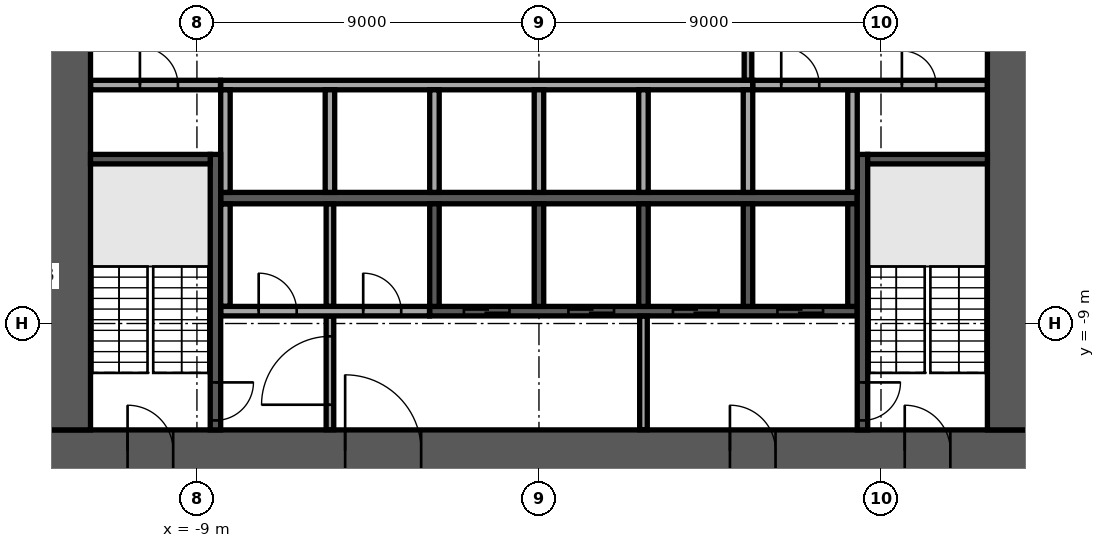
"""IFC4 building model, lengths in metres.
Left out: names, types, materials, properties, quantities, classifications, styles, units other than length and angle.
Written with IfcOpenShell. Run it as: python <this file> out.ifc"""

import sys

from ifc_helpers import new_model, si_unit, direction, frame, frame_2d, origin, place, context, subcontext, project, spatial, rectangle, extrude, element, fill, save


model = new_model("IFC4")
c1 = context("Model", 3, precision=1e-05, world=origin(), true_north=direction((0.0, 1.0)))
c2 = subcontext(c1, "Body", "Model", "MODEL_VIEW")
j1 = project(units=[si_unit("LENGTHUNIT", "METRE"), si_unit("PLANEANGLEUNIT", "RADIAN")], contexts=[c1])
p1 = place(None, origin())
s1 = spatial("IfcSite", under=j1, at=p1, CompositionType="ELEMENT")
p2 = place(p1, origin())
s2 = spatial("IfcBuilding", under=s1, at=p2, CompositionType="ELEMENT")
p3 = place(p2, frame((0.0, 0.0, 90.1)))
s3 = spatial("IfcBuildingStorey", under=s2, at=p3, CompositionType="ELEMENT", Elevation=90.1)
p4 = place(p3, frame((-12.9, -12.35, 0.0), z_axis=(0.0, 0.0, 1.0), x_axis=(1.0, 0.0, 0.0)))
e1 = element("IfcWall", 1, at=p4, inside=s3, PredefinedType="SHEAR", context=c2, shape_type="SweptSolid", body=[
    extrude(rectangle(XDim=25.8, YDim=1.1, at=frame_2d((12.9, 0.0))), origin(), (0.0, 0.0, 1.0), 3.58),
])
p5 = place(p4, frame((7.8, 0.0, 0.0)))
e2 = element("IfcOpeningElement", 2, at=p5, cuts=e1, PredefinedType="OPENING", context=c2, shape_type="SweptSolid", body=[
    extrude(rectangle(XDim=2.0, YDim=2.1, at=frame_2d((1.0, 1.05))), frame((0.0, 0.56, 0.0), z_axis=(0.0, -1.0, 0.0), x_axis=(1.0, 0.0, 0.0)), (0.0, 0.0, 1.0), 1.12),
])
p6 = place(p4, frame((17.925, 0.0, 0.0)))
e3 = element("IfcOpeningElement", 3, at=p6, cuts=e1, PredefinedType="OPENING", context=c2, shape_type="SweptSolid", body=[
    extrude(rectangle(XDim=1.2, YDim=2.1, at=frame_2d((0.6, 1.05))), frame((0.0, 0.56, 0.0), z_axis=(0.0, -1.0, 0.0), x_axis=(1.0, 0.0, 0.0)), (0.0, 0.0, 1.0), 1.12),
])
p7 = place(p4, frame((2.075, 0.0, 0.0)))
e4 = element("IfcOpeningElement", 4, at=p7, cuts=e1, PredefinedType="OPENING", context=c2, shape_type="SweptSolid", body=[
    extrude(rectangle(XDim=1.2, YDim=2.1, at=frame_2d((0.6, 1.05))), frame((0.0, 0.56, 0.0), z_axis=(0.0, -1.0, 0.0), x_axis=(1.0, 0.0, 0.0)), (0.0, 0.0, 1.0), 1.12),
])
p8 = place(p4, frame((22.525, 0.0, 0.0)))
e5 = element("IfcOpeningElement", 5, at=p8, cuts=e1, PredefinedType="OPENING", context=c2, shape_type="SweptSolid", body=[
    extrude(rectangle(XDim=1.2, YDim=2.1, at=frame_2d((0.6, 1.05))), frame((0.0, 0.56, 0.0), z_axis=(0.0, -1.0, 0.0), x_axis=(1.0, 0.0, 0.0)), (0.0, 0.0, 1.0), 1.12),
])
p9 = place(p3, frame((12.35, -11.8, 0.0), z_axis=(0.0, 0.0, 1.0), x_axis=(0.0, 1.0, 0.0)))
e6 = element("IfcWall", 6, at=p9, inside=s3, PredefinedType="SHEAR", context=c2, shape_type="SweptSolid", body=[
    extrude(rectangle(XDim=23.6, YDim=1.1, at=frame_2d((11.8, 0.0))), origin(), (0.0, 0.0, 1.0), 3.58),
])
p10 = place(p9, frame((10.6, 0.0, 0.0)))
e7 = element("IfcOpeningElement", 7, at=p10, cuts=e6, PredefinedType="OPENING", context=c2, shape_type="SweptSolid", body=[
    extrude(rectangle(XDim=2.4, YDim=2.4, at=frame_2d((1.2, 1.2))), frame((0.0, 0.56, 0.0), z_axis=(0.0, -1.0, 0.0), x_axis=(1.0, 0.0, 0.0)), (0.0, 0.0, 1.0), 1.12),
])
p11 = place(p3, frame((-12.35, -11.8, 0.0), z_axis=(0.0, 0.0, 1.0), x_axis=(0.0, 1.0, 0.0)))
e8 = element("IfcWall", 8, at=p11, inside=s3, PredefinedType="SHEAR", context=c2, shape_type="SweptSolid", body=[
    extrude(rectangle(XDim=23.6, YDim=1.1, at=frame_2d((11.8, 0.0))), origin(), (0.0, 0.0, 1.0), 3.58),
])
p12 = place(p11, frame((10.6, 0.0, 0.0)))
e9 = element("IfcOpeningElement", 9, at=p12, cuts=e8, PredefinedType="OPENING", context=c2, shape_type="SweptSolid", body=[
    extrude(rectangle(XDim=2.4, YDim=2.4, at=frame_2d((1.2, 1.2))), frame((0.0, 0.56, 0.0), z_axis=(0.0, -1.0, 0.0), x_axis=(1.0, 0.0, 0.0)), (0.0, 0.0, 1.0), 1.12),
])
p13 = place(p3, frame((-8.375, -5.7, 0.0), z_axis=(0.0, 0.0, 1.0), x_axis=(1.0, 0.0, 0.0)))
e10 = element("IfcWall", 10, at=p13, inside=s3, PredefinedType="SOLIDWALL", context=c2, shape_type="SweptSolid", body=[
    extrude(rectangle(XDim=16.75, YDim=0.3, at=frame_2d((8.375, 0.0))), origin(), (0.0, 0.0, 1.0), 3.58),
])
p14 = place(p3, frame((-8.375, -2.725, 0.0), z_axis=(0.0, 0.0, 1.0), x_axis=(1.0, 0.0, 0.0)))
e11 = element("IfcWall", 11, at=p14, inside=s3, PredefinedType="SOLIDWALL", context=c2, shape_type="SweptSolid", body=[
    extrude(rectangle(XDim=14.0, YDim=0.25, at=frame_2d((7.0, 0.0))), origin(), (0.0, 0.0, 1.0), 3.58),
])
for number, where, z_axis, x_axis in (
    (12, (-8.25, -5.55, 0.0), (0.0, 0.0, 1.0), (0.0, 1.0, 0.0)),
    (13, (-5.5, -5.55, 0.0), (0.0, 0.0, 1.0), (0.0, 1.0, 0.0)),
    (14, (-2.75, -5.55, 0.0), (0.0, 0.0, 1.0), (0.0, 1.0, 0.0)),
    (15, (0.0, -5.55, 0.0), (0.0, 0.0, 1.0), (0.0, 1.0, 0.0)),
    (16, (2.75, -5.55, 0.0), (0.0, 0.0, 1.0), (0.0, 1.0, 0.0)),
    (17, (5.5, -5.55, 0.0), (0.0, 0.0, 1.0), (0.0, 1.0, 0.0)),
):
    element("IfcWall", number, at=place(p3, frame(where, z_axis=z_axis, x_axis=x_axis)), inside=s3, PredefinedType="SOLIDWALL", context=c2, shape_type="SweptSolid", body=[
        extrude(rectangle(XDim=2.7, YDim=0.25, at=frame_2d((1.35, 0.0))), origin(), (0.0, 0.0, 1.0), 3.58),
    ])
p15 = place(p3, frame((-2.875, -8.675, 0.0), z_axis=(0.0, 0.0, 1.0), x_axis=(1.0, 0.0, 0.0)))
e18 = element("IfcWall", 18, at=p15, inside=s3, PredefinedType="SOLIDWALL", context=c2, shape_type="SweptSolid", body=[
    extrude(rectangle(XDim=11.25, YDim=0.25, at=frame_2d((5.625, 0.0))), origin(), (0.0, 0.0, 1.0), 3.58),
])
p16 = place(p15, frame((0.9, 0.0, 0.0)))
e19 = element("IfcOpeningElement", 19, at=p16, cuts=e18, PredefinedType="OPENING", context=c2, shape_type="SweptSolid", body=[
    extrude(rectangle(XDim=1.2, YDim=2.1, at=frame_2d((0.6, 1.05))), frame((0.0, 0.135, 0.0), z_axis=(0.0, -1.0, 0.0), x_axis=(1.0, 0.0, 0.0)), (0.0, 0.0, 1.0), 0.27),
])
p17 = place(p15, frame((3.65, 0.0, 0.0)))
e20 = element("IfcOpeningElement", 20, at=p17, cuts=e18, PredefinedType="OPENING", context=c2, shape_type="SweptSolid", body=[
    extrude(rectangle(XDim=1.2, YDim=2.1, at=frame_2d((0.6, 1.05))), frame((0.0, 0.135, 0.0), z_axis=(0.0, -1.0, 0.0), x_axis=(1.0, 0.0, 0.0)), (0.0, 0.0, 1.0), 0.27),
])
p18 = place(p15, frame((6.4, 0.0, 0.0)))
e21 = element("IfcOpeningElement", 21, at=p18, cuts=e18, PredefinedType="OPENING", context=c2, shape_type="SweptSolid", body=[
    extrude(rectangle(XDim=1.2, YDim=2.1, at=frame_2d((0.6, 1.05))), frame((0.0, 0.135, 0.0), z_axis=(0.0, -1.0, 0.0), x_axis=(1.0, 0.0, 0.0)), (0.0, 0.0, 1.0), 0.27),
])
p19 = place(p15, frame((9.15, 0.0, 0.0)))
e22 = element("IfcOpeningElement", 22, at=p19, cuts=e18, PredefinedType="OPENING", context=c2, shape_type="SweptSolid", body=[
    extrude(rectangle(XDim=1.2, YDim=2.1, at=frame_2d((0.6, 1.05))), frame((0.0, 0.135, 0.0), z_axis=(0.0, -1.0, 0.0), x_axis=(1.0, 0.0, 0.0)), (0.0, 0.0, 1.0), 0.27),
])
for number, where, z_axis, x_axis in (
    (23, (-2.75, -8.55, 0.0), (0.0, 0.0, 1.0), (0.0, 1.0, 0.0)),
    (24, (0.0, -8.55, 0.0), (0.0, 0.0, 1.0), (0.0, 1.0, 0.0)),
    (25, (2.75, -8.55, 0.0), (0.0, 0.0, 1.0), (0.0, 1.0, 0.0)),
    (26, (5.5, -8.55, 0.0), (0.0, 0.0, 1.0), (0.0, 1.0, 0.0)),
    (27, (8.25, -8.55, 0.0), (0.0, 0.0, 1.0), (0.0, 1.0, 0.0)),
):
    element("IfcWall", number, at=place(p3, frame(where, z_axis=z_axis, x_axis=x_axis)), inside=s3, PredefinedType="SOLIDWALL", context=c2, shape_type="SweptSolid", body=[
        extrude(rectangle(XDim=2.7, YDim=0.25, at=frame_2d((1.35, 0.0))), origin(), (0.0, 0.0, 1.0), 3.58),
    ])
p20 = place(p3, frame((-8.512, -4.55, 0.0), z_axis=(0.0, 0.0, 1.0), x_axis=(0.0, -1.0, 0.0)))
e28 = element("IfcWall", 28, at=p20, inside=s3, PredefinedType="SOLIDWALL", context=c2, shape_type="SweptSolid", body=[
    extrude(rectangle(XDim=7.25, YDim=0.275, at=frame_2d((3.625, 0.0))), origin(), (0.0, 0.0, 1.0), 3.58),
])
p21 = place(p20, frame((6.0, 0.0, 0.0)))
e29 = element("IfcOpeningElement", 29, at=p21, cuts=e28, PredefinedType="OPENING", context=c2, shape_type="SweptSolid", body=[
    extrude(rectangle(XDim=1.0, YDim=2.1, at=frame_2d((0.5, 1.05))), frame((0.0, 0.147, 0.0), z_axis=(0.0, -1.0, 0.0), x_axis=(1.0, 0.0, 0.0)), (0.0, 0.0, 1.0), 0.295),
])
p22 = place(p3, frame((-8.65, -4.675, 0.0), z_axis=(0.0, 0.0, 1.0), x_axis=(-1.0, 0.0, 0.0)))
e30 = element("IfcWall", 30, at=p22, inside=s3, PredefinedType="SOLIDWALL", context=c2, shape_type="SweptSolid", body=[
    extrude(rectangle(XDim=3.15, YDim=0.25, at=frame_2d((1.575, 0.0))), origin(), (0.0, 0.0, 1.0), 3.58),
])
p23 = place(p3, frame((8.512, -4.55, 0.0), z_axis=(0.0, 0.0, 1.0), x_axis=(0.0, -1.0, 0.0)))
e31 = element("IfcWall", 31, at=p23, inside=s3, PredefinedType="SOLIDWALL", context=c2, shape_type="SweptSolid", body=[
    extrude(rectangle(XDim=7.25, YDim=0.275, at=frame_2d((3.625, 0.0))), origin(), (0.0, 0.0, 1.0), 3.58),
])
p24 = place(p23, frame((6.0, 0.0, 0.0)))
e32 = element("IfcOpeningElement", 32, at=p24, cuts=e31, PredefinedType="OPENING", context=c2, shape_type="SweptSolid", body=[
    extrude(rectangle(XDim=1.0, YDim=2.1, at=frame_2d((0.5, 1.05))), frame((0.0, 0.147, 0.0), z_axis=(0.0, -1.0, 0.0), x_axis=(1.0, 0.0, 0.0)), (0.0, 0.0, 1.0), 0.295),
])
p25 = place(p3, frame((8.65, -4.675, 0.0), z_axis=(0.0, 0.0, 1.0), x_axis=(1.0, 0.0, 0.0)))
e33 = element("IfcWall", 33, at=p25, inside=s3, PredefinedType="SOLIDWALL", context=c2, shape_type="SweptSolid", body=[
    extrude(rectangle(XDim=3.15, YDim=0.25, at=frame_2d((1.575, 0.0))), origin(), (0.0, 0.0, 1.0), 3.58),
])
p26 = place(p3, frame((-5.5, -11.795, 0.0), z_axis=(0.0, 0.0, 1.0), x_axis=(0.0, 1.0, 0.0)))
e34 = element("IfcWall", 34, at=p26, inside=s3, PredefinedType="PARTITIONING", context=c2, shape_type="SweptSolid", body=[
    extrude(rectangle(XDim=2.99, YDim=0.2, at=frame_2d((1.495, 0.0))), origin(), (0.0, 0.0, 1.0), 3.58),
])
p27 = place(p26, frame((0.657, 0.0, 0.0)))
e35 = element("IfcOpeningElement", 35, at=p27, cuts=e34, PredefinedType="OPENING", context=c2, shape_type="SweptSolid", body=[
    extrude(rectangle(XDim=1.8, YDim=2.1, at=frame_2d((0.9, 1.05))), frame((0.0, 0.11, 0.0), z_axis=(0.0, -1.0, 0.0), x_axis=(1.0, 0.0, 0.0)), (0.0, 0.0, 1.0), 0.22),
])
p28 = place(p3, frame((2.75, -11.795, 0.0), z_axis=(0.0, 0.0, 1.0), x_axis=(0.0, 1.0, 0.0)))
e36 = element("IfcWall", 36, at=p28, inside=s3, PredefinedType="PARTITIONING", context=c2, shape_type="SweptSolid", body=[
    extrude(rectangle(XDim=2.99, YDim=0.2, at=frame_2d((1.495, 0.0))), origin(), (0.0, 0.0, 1.0), 3.58),
])
p29 = place(p3, frame((-8.37, -8.675, 0.0), z_axis=(0.0, 0.0, 1.0), x_axis=(1.0, 0.0, 0.0)))
e37 = element("IfcWall", 37, at=p29, inside=s3, PredefinedType="PARTITIONING", context=c2, shape_type="SweptSolid", body=[
    extrude(rectangle(XDim=5.49, YDim=0.25, at=frame_2d((2.745, 0.0))), origin(), (0.0, 0.0, 1.0), 3.58),
])
p30 = place(p29, frame((0.995, 0.0, 0.0)))
e38 = element("IfcOpeningElement", 38, at=p30, cuts=e37, PredefinedType="OPENING", context=c2, shape_type="SweptSolid", body=[
    extrude(rectangle(XDim=1.0, YDim=2.1, at=frame_2d((0.5, 1.05))), frame((0.0, 0.135, 0.0), z_axis=(0.0, -1.0, 0.0), x_axis=(1.0, 0.0, 0.0)), (0.0, 0.0, 1.0), 0.27),
])
p31 = place(p29, frame((3.745, 0.0, 0.0)))
e39 = element("IfcOpeningElement", 39, at=p31, cuts=e37, PredefinedType="OPENING", context=c2, shape_type="SweptSolid", body=[
    extrude(rectangle(XDim=1.0, YDim=2.1, at=frame_2d((0.5, 1.05))), frame((0.0, 0.135, 0.0), z_axis=(0.0, -1.0, 0.0), x_axis=(1.0, 0.0, 0.0)), (0.0, 0.0, 1.0), 0.27),
])
p32 = place(p3, frame((-8.25, -8.545, 0.0), z_axis=(0.0, 0.0, 1.0), x_axis=(0.0, 1.0, 0.0)))
e40 = element("IfcWall", 40, at=p32, inside=s3, PredefinedType="PARTITIONING", context=c2, shape_type="SweptSolid", body=[
    extrude(rectangle(XDim=2.69, YDim=0.25, at=frame_2d((1.345, 0.0))), origin(), (0.0, 0.0, 1.0), 3.58),
])
p33 = place(p3, frame((-5.5, -8.545, 0.0), z_axis=(0.0, 0.0, 1.0), x_axis=(0.0, 1.0, 0.0)))
e41 = element("IfcWall", 41, at=p33, inside=s3, PredefinedType="PARTITIONING", context=c2, shape_type="SweptSolid", body=[
    extrude(rectangle(XDim=2.69, YDim=0.2, at=frame_2d((1.345, 0.0))), origin(), (0.0, 0.0, 1.0), 3.58),
])
p34 = place(p3, frame((8.25, -5.545, 0.0), z_axis=(0.0, 0.0, 1.0), x_axis=(0.0, 1.0, 0.0)))
e42 = element("IfcWall", 42, at=p34, inside=s3, PredefinedType="PARTITIONING", context=c2, shape_type="SweptSolid", body=[
    extrude(rectangle(XDim=2.69, YDim=0.25, at=frame_2d((1.345, 0.0))), origin(), (0.0, 0.0, 1.0), 3.58),
])
p35 = place(p3, frame((-11.795, -2.725, 0.0), z_axis=(0.0, 0.0, 1.0), x_axis=(1.0, 0.0, 0.0)))
e43 = element("IfcWall", 43, at=p35, inside=s3, PredefinedType="PARTITIONING", context=c2, shape_type="SweptSolid", body=[
    extrude(rectangle(XDim=3.415, YDim=0.25, at=frame_2d((1.708, 0.0))), origin(), (0.0, 0.0, 1.0), 3.58),
])
p36 = place(p35, frame((1.295, 0.0, 0.0)))
e44 = element("IfcOpeningElement", 44, at=p36, cuts=e43, PredefinedType="OPENING", context=c2, shape_type="SweptSolid", body=[
    extrude(rectangle(XDim=1.0, YDim=2.1, at=frame_2d((0.5, 1.05))), frame((0.0, 0.135, 0.0), z_axis=(0.0, -1.0, 0.0), x_axis=(1.0, 0.0, 0.0)), (0.0, 0.0, 1.0), 0.27),
])
p37 = place(p3, frame((5.63, -2.725, 0.0), z_axis=(0.0, 0.0, 1.0), x_axis=(1.0, 0.0, 0.0)))
e45 = element("IfcWall", 45, at=p37, inside=s3, PredefinedType="PARTITIONING", context=c2, shape_type="SweptSolid", body=[
    extrude(rectangle(XDim=6.165, YDim=0.25, at=frame_2d((3.083, 0.0))), origin(), (0.0, 0.0, 1.0), 3.58),
])
p38 = place(p37, frame((0.745, 0.0, 0.0)))
e46 = element("IfcOpeningElement", 46, at=p38, cuts=e45, PredefinedType="OPENING", context=c2, shape_type="SweptSolid", body=[
    extrude(rectangle(XDim=1.0, YDim=2.1, at=frame_2d((0.5, 1.05))), frame((0.0, 0.135, 0.0), z_axis=(0.0, -1.0, 0.0), x_axis=(1.0, 0.0, 0.0)), (0.0, 0.0, 1.0), 0.27),
])
p39 = place(p37, frame((3.92, 0.0, 0.0)))
e47 = element("IfcOpeningElement", 47, at=p39, cuts=e45, PredefinedType="OPENING", context=c2, shape_type="SweptSolid", body=[
    extrude(rectangle(XDim=0.9, YDim=2.1, at=frame_2d((0.45, 1.05))), frame((0.0, 0.135, 0.0), z_axis=(0.0, -1.0, 0.0), x_axis=(1.0, 0.0, 0.0)), (0.0, 0.0, 1.0), 0.27),
])
p40 = place(p3, frame((5.5, -2.595, 0.0), z_axis=(0.0, 0.0, 1.0), x_axis=(0.0, 1.0, 0.0)))
e48 = element("IfcWall", 48, at=p40, inside=s3, PredefinedType="PARTITIONING", context=c2, shape_type="SweptSolid", body=[
    extrude(rectangle(XDim=5.19, YDim=0.2, at=frame_2d((2.595, 0.0))), origin(), (0.0, 0.0, 1.0), 3.58),
])
p41 = place(p40, frame((1.395, 0.0, 0.0)))
e49 = element("IfcOpeningElement", 49, at=p41, cuts=e48, PredefinedType="OPENING", context=c2, shape_type="SweptSolid", body=[
    extrude(rectangle(XDim=2.4, YDim=2.4, at=frame_2d((1.2, 1.2))), frame((0.0, 0.11, 0.0), z_axis=(0.0, -1.0, 0.0), x_axis=(1.0, 0.0, 0.0)), (0.0, 0.0, 1.0), 0.22),
])
p42 = place(p5, origin())
e50 = element("IfcDoor", 50, at=p42, inside=s3, OperationType="SINGLE_SWING_LEFT", PredefinedType="DOOR", context=c2, shape_type="SweptSolid", body=[
    extrude(rectangle(XDim=2.0, YDim=2.1, at=frame_2d((1.0, 1.05))), frame((0.0, 0.025, 0.0), z_axis=(0.0, -1.0, 0.0), x_axis=(1.0, 0.0, 0.0)), (0.0, 0.0, 1.0), 0.05),
])
fill(e2, e50)
p43 = place(p6, origin())
e51 = element("IfcDoor", 51, at=p43, inside=s3, OperationType="SINGLE_SWING_LEFT", PredefinedType="DOOR", context=c2, shape_type="SweptSolid", body=[
    extrude(rectangle(XDim=1.2, YDim=2.1, at=frame_2d((0.6, 1.05))), frame((0.0, 0.025, 0.0), z_axis=(0.0, -1.0, 0.0), x_axis=(1.0, 0.0, 0.0)), (0.0, 0.0, 1.0), 0.05),
])
fill(e3, e51)
p44 = place(p7, origin())
e52 = element("IfcDoor", 52, at=p44, inside=s3, OperationType="SINGLE_SWING_LEFT", PredefinedType="DOOR", context=c2, shape_type="SweptSolid", body=[
    extrude(rectangle(XDim=1.2, YDim=2.1, at=frame_2d((0.6, 1.05))), frame((0.0, 0.025, 0.0), z_axis=(0.0, -1.0, 0.0), x_axis=(1.0, 0.0, 0.0)), (0.0, 0.0, 1.0), 0.05),
])
fill(e4, e52)
p45 = place(p8, origin())
e53 = element("IfcDoor", 53, at=p45, inside=s3, OperationType="SINGLE_SWING_LEFT", PredefinedType="DOOR", context=c2, shape_type="SweptSolid", body=[
    extrude(rectangle(XDim=1.2, YDim=2.1, at=frame_2d((0.6, 1.05))), frame((0.0, 0.025, 0.0), z_axis=(0.0, -1.0, 0.0), x_axis=(1.0, 0.0, 0.0)), (0.0, 0.0, 1.0), 0.05),
])
fill(e5, e53)
p46 = place(p16, origin())
e54 = element("IfcDoor", 54, at=p46, inside=s3, OperationType="DOUBLE_DOOR_SLIDING", PredefinedType="DOOR", context=c2, shape_type="SweptSolid", body=[
    extrude(rectangle(XDim=1.2, YDim=2.1, at=frame_2d((0.6, 1.05))), frame((0.0, 0.025, 0.0), z_axis=(0.0, -1.0, 0.0), x_axis=(1.0, 0.0, 0.0)), (0.0, 0.0, 1.0), 0.05),
])
fill(e19, e54)
p47 = place(p17, origin())
e55 = element("IfcDoor", 55, at=p47, inside=s3, OperationType="DOUBLE_DOOR_SLIDING", PredefinedType="DOOR", context=c2, shape_type="SweptSolid", body=[
    extrude(rectangle(XDim=1.2, YDim=2.1, at=frame_2d((0.6, 1.05))), frame((0.0, 0.025, 0.0), z_axis=(0.0, -1.0, 0.0), x_axis=(1.0, 0.0, 0.0)), (0.0, 0.0, 1.0), 0.05),
])
fill(e20, e55)
p48 = place(p18, origin())
e56 = element("IfcDoor", 56, at=p48, inside=s3, OperationType="DOUBLE_DOOR_SLIDING", PredefinedType="DOOR", context=c2, shape_type="SweptSolid", body=[
    extrude(rectangle(XDim=1.2, YDim=2.1, at=frame_2d((0.6, 1.05))), frame((0.0, 0.025, 0.0), z_axis=(0.0, -1.0, 0.0), x_axis=(1.0, 0.0, 0.0)), (0.0, 0.0, 1.0), 0.05),
])
fill(e21, e56)
p49 = place(p19, origin())
e57 = element("IfcDoor", 57, at=p49, inside=s3, OperationType="DOUBLE_DOOR_SLIDING", PredefinedType="DOOR", context=c2, shape_type="SweptSolid", body=[
    extrude(rectangle(XDim=1.2, YDim=2.1, at=frame_2d((0.6, 1.05))), frame((0.0, 0.025, 0.0), z_axis=(0.0, -1.0, 0.0), x_axis=(1.0, 0.0, 0.0)), (0.0, 0.0, 1.0), 0.05),
])
fill(e22, e57)
p50 = place(p21, origin())
e58 = element("IfcDoor", 58, at=p50, inside=s3, OperationType="SINGLE_SWING_LEFT", PredefinedType="DOOR", context=c2, shape_type="SweptSolid", body=[
    extrude(rectangle(XDim=1.0, YDim=2.1, at=frame_2d((0.5, 1.05))), frame((0.0, 0.025, 0.0), z_axis=(0.0, -1.0, 0.0), x_axis=(1.0, 0.0, 0.0)), (0.0, 0.0, 1.0), 0.05),
])
fill(e29, e58)
p51 = place(p24, origin())
e59 = element("IfcDoor", 59, at=p51, inside=s3, OperationType="SINGLE_SWING_LEFT", PredefinedType="DOOR", context=c2, shape_type="SweptSolid", body=[
    extrude(rectangle(XDim=1.0, YDim=2.1, at=frame_2d((0.5, 1.05))), frame((0.0, 0.025, 0.0), z_axis=(0.0, -1.0, 0.0), x_axis=(1.0, 0.0, 0.0)), (0.0, 0.0, 1.0), 0.05),
])
fill(e32, e59)
p52 = place(p30, origin())
e60 = element("IfcDoor", 60, at=p52, inside=s3, OperationType="SINGLE_SWING_LEFT", PredefinedType="DOOR", context=c2, shape_type="SweptSolid", body=[
    extrude(rectangle(XDim=1.0, YDim=2.1, at=frame_2d((0.5, 1.05))), frame((0.0, 0.025, 0.0), z_axis=(0.0, -1.0, 0.0), x_axis=(1.0, 0.0, 0.0)), (0.0, 0.0, 1.0), 0.05),
])
fill(e38, e60)
p53 = place(p31, origin())
e61 = element("IfcDoor", 61, at=p53, inside=s3, OperationType="SINGLE_SWING_LEFT", PredefinedType="DOOR", context=c2, shape_type="SweptSolid", body=[
    extrude(rectangle(XDim=1.0, YDim=2.1, at=frame_2d((0.5, 1.05))), frame((0.0, 0.025, 0.0), z_axis=(0.0, -1.0, 0.0), x_axis=(1.0, 0.0, 0.0)), (0.0, 0.0, 1.0), 0.05),
])
fill(e39, e61)
p54 = place(p36, origin())
e62 = element("IfcDoor", 62, at=p54, inside=s3, OperationType="SINGLE_SWING_LEFT", PredefinedType="DOOR", context=c2, shape_type="SweptSolid", body=[
    extrude(rectangle(XDim=1.0, YDim=2.1, at=frame_2d((0.5, 1.05))), frame((0.0, 0.025, 0.0), z_axis=(0.0, -1.0, 0.0), x_axis=(1.0, 0.0, 0.0)), (0.0, 0.0, 1.0), 0.05),
])
fill(e44, e62)
p55 = place(p38, origin())
e63 = element("IfcDoor", 63, at=p55, inside=s3, OperationType="SINGLE_SWING_LEFT", PredefinedType="DOOR", context=c2, shape_type="SweptSolid", body=[
    extrude(rectangle(XDim=1.0, YDim=2.1, at=frame_2d((0.5, 1.05))), frame((0.0, 0.025, 0.0), z_axis=(0.0, -1.0, 0.0), x_axis=(1.0, 0.0, 0.0)), (0.0, 0.0, 1.0), 0.05),
])
fill(e46, e63)
p56 = place(p39, origin())
e64 = element("IfcDoor", 64, at=p56, inside=s3, OperationType="SINGLE_SWING_LEFT", PredefinedType="DOOR", context=c2, shape_type="SweptSolid", body=[
    extrude(rectangle(XDim=0.9, YDim=2.1, at=frame_2d((0.45, 1.05))), frame((0.0, 0.025, 0.0), z_axis=(0.0, -1.0, 0.0), x_axis=(1.0, 0.0, 0.0)), (0.0, 0.0, 1.0), 0.05),
])
fill(e47, e64)
p57 = place(p27, origin())
e65 = element("IfcDoor", 65, at=p57, inside=s3, OperationType="SINGLE_SWING_LEFT", PredefinedType="DOOR", context=c2, shape_type="SweptSolid", body=[
    extrude(rectangle(XDim=1.8, YDim=2.1, at=frame_2d((0.9, 1.05))), frame((0.0, 0.025, 0.0), z_axis=(0.0, -1.0, 0.0), x_axis=(1.0, 0.0, 0.0)), (0.0, 0.0, 1.0), 0.05),
])
fill(e35, e65)
save(model, sys.argv[1])
